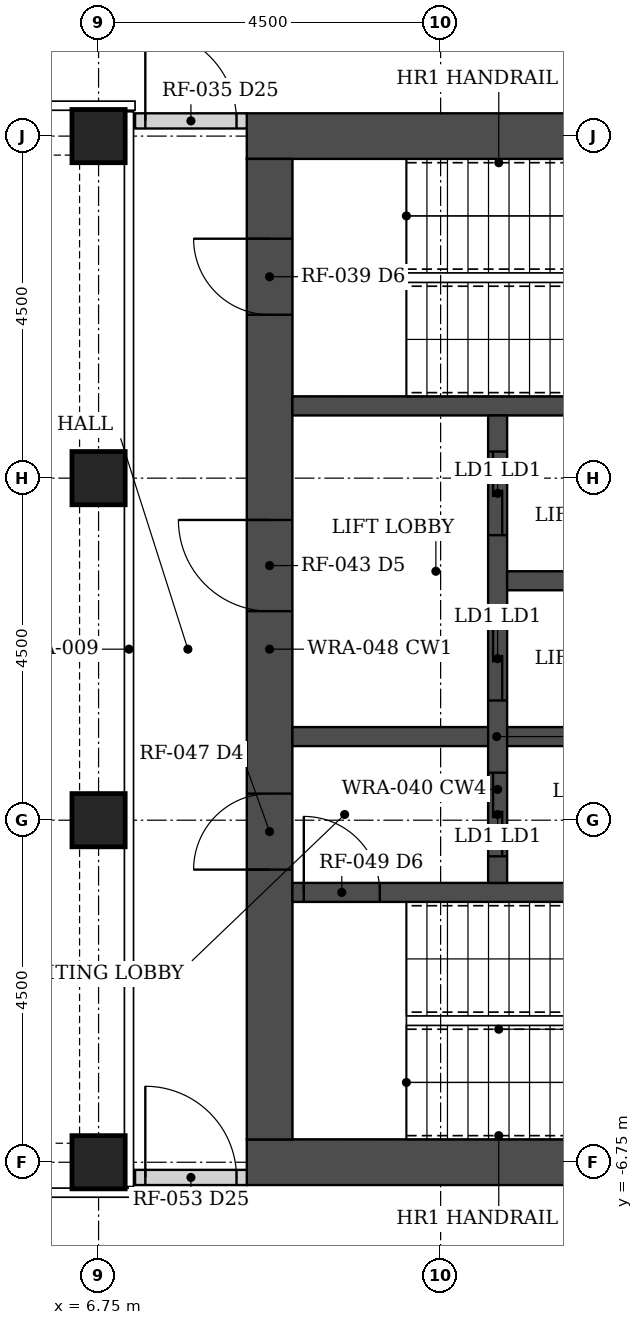
"""IFC4 building model, lengths in metres.
Left out: names, types, materials, properties, quantities, classifications, styles, units other than length and angle.
Written with IfcOpenShell. Run it as: python <this file> out.ifc"""

import sys

from ifc_helpers import new_model, si_unit, direction, frame, frame_2d, origin, origin_2d, place, context, subcontext, project, spatial, rectangle, hollow_rectangle, extrude, element, fill, save


model = new_model("IFC4")
c1 = context("Model", 3, precision=1e-05, world=origin(), true_north=direction((0.0, 1.0)))
c2 = subcontext(c1, "Body", "Model", "MODEL_VIEW")
j1 = project(units=[si_unit("LENGTHUNIT", "METRE"), si_unit("PLANEANGLEUNIT", "RADIAN")], contexts=[c1])
p1 = place(None, origin())
s1 = spatial("IfcSite", under=j1, at=p1, CompositionType="ELEMENT")
p2 = place(p1, origin())
s2 = spatial("IfcBuilding", under=s1, at=p2, CompositionType="ELEMENT")
p3 = place(p2, frame((0.0, 0.0, 79.0)))
s3 = spatial("IfcBuildingStorey", under=s2, at=p3, CompositionType="ELEMENT", Elevation=79.0)
for number, where, z_axis, x_axis in (
    (1, (6.75, -6.75, 0.0), (0.0, 0.0, 1.0), (1.0, 0.0, 0.0)),
    (2, (6.75, -2.25, 0.0), (0.0, 0.0, 1.0), (1.0, 0.0, 0.0)),
    (3, (6.75, 2.25, 0.0), (0.0, 0.0, 1.0), (1.0, 0.0, 0.0)),
    (4, (6.75, 6.75, 0.0), (0.0, 0.0, 1.0), (1.0, 0.0, 0.0)),
):
    element("IfcColumn", number, at=place(p3, frame(where, z_axis=z_axis, x_axis=x_axis)), inside=s3, PredefinedType="COLUMN", context=c2, shape_type="SweptSolid", body=[
        extrude(hollow_rectangle(XDim=0.7, YDim=0.7, WallThickness=0.05, at=origin_2d()), origin(), (0.0, 0.0, 1.0), 3.5),
    ])
for number, where, z_axis, x_axis in (
    (5, (8.7, -6.75, 0.0), (0.0, 0.0, 1.0), (1.0, 0.0, 0.0)),
    (6, (8.7, 6.75, 0.0), (0.0, 0.0, 1.0), (1.0, 0.0, 0.0)),
):
    element("IfcWall", number, at=place(p3, frame(where, z_axis=z_axis, x_axis=x_axis)), inside=s3, PredefinedType="SHEAR", context=c2, shape_type="SweptSolid", body=[
        extrude(rectangle(XDim=9.6, YDim=0.6, at=frame_2d((4.8, 0.0))), origin(), (0.0, 0.0, 1.0), 3.5),
    ])
p4 = place(p3, frame((9.0, -6.45, 0.0), z_axis=(0.0, 0.0, 1.0), x_axis=(0.0, 1.0, 0.0)))
e7 = element("IfcWall", 7, at=p4, inside=s3, PredefinedType="SHEAR", context=c2, shape_type="SweptSolid", body=[
    extrude(rectangle(XDim=12.9, YDim=0.6, at=frame_2d((6.45, 0.0))), origin(), (0.0, 0.0, 1.0), 3.5),
])
p5 = place(p4, frame((3.55, 0.0, 0.0)))
e8 = element("IfcOpeningElement", 8, at=p5, cuts=e7, PredefinedType="OPENING", context=c2, shape_type="SweptSolid", body=[
    extrude(rectangle(XDim=1.0, YDim=2.1, at=frame_2d((0.5, 1.05))), frame((0.0, 0.31, 0.0), z_axis=(0.0, -1.0, 0.0), x_axis=(1.0, 0.0, 0.0)), (0.0, 0.0, 1.0), 0.62),
])
p6 = place(p4, frame((6.95, 0.0, 0.0)))
e9 = element("IfcOpeningElement", 9, at=p6, cuts=e7, PredefinedType="OPENING", context=c2, shape_type="SweptSolid", body=[
    extrude(rectangle(XDim=1.2, YDim=2.1, at=frame_2d((0.6, 1.05))), frame((0.0, 0.31, 0.0), z_axis=(0.0, -1.0, 0.0), x_axis=(1.0, 0.0, 0.0)), (0.0, 0.0, 1.0), 0.62),
])
p7 = place(p4, frame((10.85, 0.0, 0.0)))
e10 = element("IfcOpeningElement", 10, at=p7, cuts=e7, PredefinedType="OPENING", context=c2, shape_type="SweptSolid", body=[
    extrude(rectangle(XDim=1.0, YDim=2.1, at=frame_2d((0.5, 1.05))), frame((0.0, 0.31, 0.0), z_axis=(0.0, -1.0, 0.0), x_axis=(1.0, 0.0, 0.0)), (0.0, 0.0, 1.0), 0.62),
])
p8 = place(p3, frame((9.3, -3.2, 0.0), z_axis=(0.0, 0.0, 1.0), x_axis=(1.0, 0.0, 0.0)))
e11 = element("IfcWall", 11, at=p8, inside=s3, PredefinedType="SHEAR", context=c2, shape_type="SweptSolid", body=[
    extrude(rectangle(XDim=8.4, YDim=0.25, at=frame_2d((4.2, 0.0))), origin(), (0.0, 0.0, 1.0), 3.5),
])
p9 = place(p8, frame((0.15, 0.0, 0.0)))
e12 = element("IfcOpeningElement", 12, at=p9, cuts=e11, PredefinedType="OPENING", context=c2, shape_type="SweptSolid", body=[
    extrude(rectangle(XDim=1.0, YDim=2.1, at=frame_2d((0.5, 1.05))), frame((0.0, 0.135, 0.0), z_axis=(0.0, -1.0, 0.0), x_axis=(1.0, 0.0, 0.0)), (0.0, 0.0, 1.0), 0.27),
])
p10 = place(p3, frame((9.3, 3.2, 0.0), z_axis=(0.0, 0.0, 1.0), x_axis=(1.0, 0.0, 0.0)))
e13 = element("IfcWall", 13, at=p10, inside=s3, PredefinedType="SHEAR", context=c2, shape_type="SweptSolid", body=[
    extrude(rectangle(XDim=8.4, YDim=0.25, at=frame_2d((4.2, 0.0))), origin(), (0.0, 0.0, 1.0), 3.5),
])
p11 = place(p3, frame((9.3, -1.15, 0.0), z_axis=(0.0, 0.0, 1.0), x_axis=(1.0, 0.0, 0.0)))
e14 = element("IfcWall", 14, at=p11, inside=s3, PredefinedType="SHEAR", context=c2, shape_type="SweptSolid", body=[
    extrude(rectangle(XDim=5.375, YDim=0.25, at=frame_2d((2.688, 0.0))), origin(), (0.0, 0.0, 1.0), 3.5),
])
p12 = place(p3, frame((12.0, -3.075, 0.0), z_axis=(0.0, 0.0, 1.0), x_axis=(0.0, 1.0, 0.0)))
e15 = element("IfcWall", 15, at=p12, inside=s3, PredefinedType="SHEAR", context=c2, shape_type="SweptSolid", body=[
    extrude(rectangle(XDim=6.15, YDim=0.25, at=frame_2d((3.075, 0.0))), origin(), (0.0, 0.0, 1.0), 3.5),
])
p13 = place(p12, frame((0.35, 0.0, 0.0)))
e16 = element("IfcOpeningElement", 16, at=p13, cuts=e15, PredefinedType="OPENING", context=c2, shape_type="SweptSolid", body=[
    extrude(rectangle(XDim=1.1, YDim=2.1, at=frame_2d((0.55, 1.05))), frame((0.0, 0.135, 0.0), z_axis=(0.0, -1.0, 0.0), x_axis=(1.0, 0.0, 0.0)), (0.0, 0.0, 1.0), 0.27),
])
p14 = place(p12, frame((2.4, 0.0, 0.0)))
e17 = element("IfcOpeningElement", 17, at=p14, cuts=e15, PredefinedType="OPENING", context=c2, shape_type="SweptSolid", body=[
    extrude(rectangle(XDim=1.1, YDim=2.1, at=frame_2d((0.55, 1.05))), frame((0.0, 0.135, 0.0), z_axis=(0.0, -1.0, 0.0), x_axis=(1.0, 0.0, 0.0)), (0.0, 0.0, 1.0), 0.27),
])
p15 = place(p12, frame((4.575, 0.0, 0.0)))
e18 = element("IfcOpeningElement", 18, at=p15, cuts=e15, PredefinedType="OPENING", context=c2, shape_type="SweptSolid", body=[
    extrude(rectangle(XDim=1.1, YDim=2.1, at=frame_2d((0.55, 1.05))), frame((0.0, 0.135, 0.0), z_axis=(0.0, -1.0, 0.0), x_axis=(1.0, 0.0, 0.0)), (0.0, 0.0, 1.0), 0.27),
])
p16 = place(p3, frame((12.125, 0.9, 0.0), z_axis=(0.0, 0.0, 1.0), x_axis=(1.0, 0.0, 0.0)))
e19 = element("IfcWall", 19, at=p16, inside=s3, PredefinedType="SHEAR", context=c2, shape_type="SweptSolid", body=[
    extrude(rectangle(XDim=2.55, YDim=0.25, at=frame_2d((1.275, 0.0))), origin(), (0.0, 0.0, 1.0), 3.5),
])
p17 = place(p3, frame((7.23, 6.95, 0.0), z_axis=(0.0, 0.0, 1.0), x_axis=(1.0, 0.0, 0.0)))
e20 = element("IfcWall", 20, at=p17, inside=s3, PredefinedType="PARTITIONING", context=c2, shape_type="SweptSolid", body=[
    extrude(rectangle(XDim=1.47, YDim=0.2, at=frame_2d((0.735, 0.0))), origin(), (0.0, 0.0, 1.0), 2.373),
])
p18 = place(p17, frame((0.135, 0.0, 0.0)))
e21 = element("IfcOpeningElement", 21, at=p18, cuts=e20, PredefinedType="OPENING", context=c2, shape_type="SweptSolid", body=[
    extrude(rectangle(XDim=1.2, YDim=2.1, at=frame_2d((0.6, 1.05))), frame((0.0, 0.11, 0.0), z_axis=(0.0, -1.0, 0.0), x_axis=(1.0, 0.0, 0.0)), (0.0, 0.0, 1.0), 0.22),
])
p19 = place(p3, frame((7.23, -6.95, 0.0), z_axis=(0.0, 0.0, 1.0), x_axis=(1.0, 0.0, 0.0)))
e22 = element("IfcWall", 22, at=p19, inside=s3, PredefinedType="PARTITIONING", context=c2, shape_type="SweptSolid", body=[
    extrude(rectangle(XDim=1.47, YDim=0.2, at=frame_2d((0.735, 0.0))), origin(), (0.0, 0.0, 1.0), 2.373),
])
p20 = place(p19, frame((0.135, 0.0, 0.0)))
e23 = element("IfcOpeningElement", 23, at=p20, cuts=e22, PredefinedType="OPENING", context=c2, shape_type="SweptSolid", body=[
    extrude(rectangle(XDim=1.2, YDim=2.1, at=frame_2d((0.6, 1.05))), frame((0.0, 0.11, 0.0), z_axis=(0.0, -1.0, 0.0), x_axis=(1.0, 0.0, 0.0)), (0.0, 0.0, 1.0), 0.22),
])
p21 = place(p18, origin())
e24 = element("IfcDoor", 24, at=p21, inside=s3, OperationType="DOUBLE_DOOR_DOUBLE_SWING", PredefinedType="DOOR", context=c2, shape_type="SweptSolid", body=[
    extrude(rectangle(XDim=1.2, YDim=2.1, at=frame_2d((0.6, 1.05))), frame((0.0, 0.025, 0.0), z_axis=(0.0, -1.0, 0.0), x_axis=(1.0, 0.0, 0.0)), (0.0, 0.0, 1.0), 0.05),
])
fill(e21, e24)
p22 = place(p20, origin())
e25 = element("IfcDoor", 25, at=p22, inside=s3, OperationType="DOUBLE_DOOR_DOUBLE_SWING", PredefinedType="DOOR", context=c2, shape_type="SweptSolid", body=[
    extrude(rectangle(XDim=1.2, YDim=2.1, at=frame_2d((0.6, 1.05))), frame((0.0, 0.025, 0.0), z_axis=(0.0, -1.0, 0.0), x_axis=(1.0, 0.0, 0.0)), (0.0, 0.0, 1.0), 0.05),
])
fill(e23, e25)
p23 = place(p5, origin())
e26 = element("IfcDoor", 26, at=p23, inside=s3, OperationType="SINGLE_SWING_LEFT", PredefinedType="DOOR", context=c2, shape_type="SweptSolid", body=[
    extrude(rectangle(XDim=1.0, YDim=2.1, at=frame_2d((0.5, 1.05))), frame((0.0, 0.025, 0.0), z_axis=(0.0, -1.0, 0.0), x_axis=(1.0, 0.0, 0.0)), (0.0, 0.0, 1.0), 0.05),
])
fill(e8, e26)
p24 = place(p9, origin())
e27 = element("IfcDoor", 27, at=p24, inside=s3, OperationType="SINGLE_SWING_LEFT", PredefinedType="DOOR", context=c2, shape_type="SweptSolid", body=[
    extrude(rectangle(XDim=1.0, YDim=2.1, at=frame_2d((0.5, 1.05))), frame((0.0, 0.025, 0.0), z_axis=(0.0, -1.0, 0.0), x_axis=(1.0, 0.0, 0.0)), (0.0, 0.0, 1.0), 0.05),
])
fill(e12, e27)
p25 = place(p6, origin())
e28 = element("IfcDoor", 28, at=p25, inside=s3, OperationType="SINGLE_SWING_RIGHT", PredefinedType="DOOR", context=c2, shape_type="SweptSolid", body=[
    extrude(rectangle(XDim=1.2, YDim=2.1, at=frame_2d((0.6, 1.05))), frame((0.0, 0.025, 0.0), z_axis=(0.0, -1.0, 0.0), x_axis=(1.0, 0.0, 0.0)), (0.0, 0.0, 1.0), 0.05),
])
fill(e9, e28)
p26 = place(p7, origin())
e29 = element("IfcDoor", 29, at=p26, inside=s3, OperationType="SINGLE_SWING_RIGHT", PredefinedType="DOOR", context=c2, shape_type="SweptSolid", body=[
    extrude(rectangle(XDim=1.0, YDim=2.1, at=frame_2d((0.5, 1.05))), frame((0.0, 0.025, 0.0), z_axis=(0.0, -1.0, 0.0), x_axis=(1.0, 0.0, 0.0)), (0.0, 0.0, 1.0), 0.05),
])
fill(e10, e29)
p27 = place(p13, origin())
e30 = element("IfcDoor", 30, at=p27, inside=s3, OperationType="DOUBLE_DOOR_SLIDING", PredefinedType="DOOR", context=c2, shape_type="SweptSolid", body=[
    extrude(rectangle(XDim=1.1, YDim=2.1, at=frame_2d((0.55, 1.05))), frame((0.0, 0.025, 0.0), z_axis=(0.0, -1.0, 0.0), x_axis=(1.0, 0.0, 0.0)), (0.0, 0.0, 1.0), 0.05),
])
fill(e16, e30)
p28 = place(p14, origin())
e31 = element("IfcDoor", 31, at=p28, inside=s3, OperationType="DOUBLE_DOOR_SLIDING", PredefinedType="DOOR", context=c2, shape_type="SweptSolid", body=[
    extrude(rectangle(XDim=1.1, YDim=2.1, at=frame_2d((0.55, 1.05))), frame((0.0, 0.025, 0.0), z_axis=(0.0, -1.0, 0.0), x_axis=(1.0, 0.0, 0.0)), (0.0, 0.0, 1.0), 0.05),
])
fill(e17, e31)
p29 = place(p15, origin())
e32 = element("IfcDoor", 32, at=p29, inside=s3, OperationType="DOUBLE_DOOR_SLIDING", PredefinedType="DOOR", context=c2, shape_type="SweptSolid", body=[
    extrude(rectangle(XDim=1.1, YDim=2.1, at=frame_2d((0.55, 1.05))), frame((0.0, 0.025, 0.0), z_axis=(0.0, -1.0, 0.0), x_axis=(1.0, 0.0, 0.0)), (0.0, 0.0, 1.0), 0.05),
])
fill(e18, e32)
save(model, sys.argv[1])
